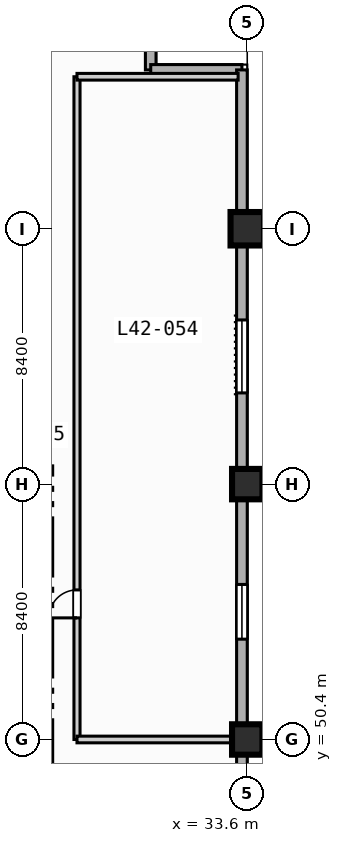
"""IFC4 building model, lengths in metres.
Left out: names, types, materials, properties, quantities, classifications, styles, units other than length and angle.
Written with IfcOpenShell. Run it as: python <this file> out.ifc"""

import sys

from ifc_helpers import new_model, si_unit, direction, frame, frame_2d, origin, origin_2d, place, context, subcontext, project, spatial, rectangle, extrude, element, fill, save


model = new_model("IFC4")
c1 = context("Model", 3, precision=1e-05, world=origin(), true_north=direction((0.0, 1.0)))
c2 = subcontext(c1, "Body", "Model", "MODEL_VIEW")
j1 = project(units=[si_unit("LENGTHUNIT", "METRE"), si_unit("PLANEANGLEUNIT", "RADIAN")], contexts=[c1])
p1 = place(None, origin())
s1 = spatial("IfcSite", under=j1, at=p1, CompositionType="ELEMENT")
p2 = place(p1, origin())
s2 = spatial("IfcBuilding", under=s1, at=p2, CompositionType="ELEMENT")
p3 = place(p2, frame((0.0, 0.0, 175.4)))
s3 = spatial("IfcBuildingStorey", under=s2, at=p3, CompositionType="ELEMENT", Elevation=175.4)
for number, where, z_axis, x_axis in (
    (1, (33.6, 50.4, 0.0), (0.0, 0.0, 1.0), (1.0, 0.0, 0.0)),
    (2, (33.6, 58.8, 0.0), (0.0, 0.0, 1.0), (1.0, 0.0, 0.0)),
):
    element("IfcColumn", number, at=place(p3, frame(where, z_axis=z_axis, x_axis=x_axis)), inside=s3, PredefinedType="COLUMN", context=c2, shape_type="SweptSolid", body=[
        extrude(rectangle(XDim=1.0, YDim=1.0, at=origin_2d()), origin(), (0.0, 0.0, 1.0), 3.7),
    ])
p4 = place(p3, frame((33.6, 67.2, 0.0), z_axis=(0.0, 0.0, 1.0), x_axis=(1.0, 0.0, 0.0)))
e3 = element("IfcColumn", 3, at=p4, inside=s3, PredefinedType="COLUMN", context=c2, shape_type="SweptSolid", body=[
    extrude(rectangle(XDim=1.1, YDim=1.1, at=origin_2d()), origin(), (0.0, 0.0, 1.0), 3.7),
])
for number, where, z_axis, x_axis in (
    (4, (30.425, 75.425, 0.0), (0.0, 0.0, 1.0), (0.0, -1.0, 0.0)),
    (5, (30.425, 72.425, 0.0), (0.0, 0.0, 1.0), (1.0, 0.0, 0.0)),
):
    element("IfcWall", number, at=place(p3, frame(where, z_axis=z_axis, x_axis=x_axis)), inside=s3, PredefinedType="STANDARD", context=c2, shape_type="SweptSolid", body=[
        extrude(rectangle(XDim=3.0, YDim=0.35, at=frame_2d((1.5, 0.0))), origin(), (0.0, 0.0, 1.0), 3.47),
    ])
p5 = place(p3, frame((33.425, 72.425, 0.0), z_axis=(0.0, 0.0, 1.0), x_axis=(0.0, -1.0, 0.0)))
e6 = element("IfcWall", 6, at=p5, inside=s3, PredefinedType="STANDARD", context=c2, shape_type="SweptSolid", body=[
    extrude(rectangle(XDim=39.0, YDim=0.35, at=frame_2d((19.5, 0.0))), origin(), (0.0, 0.0, 1.0), 3.47),
])
p6 = place(p5, frame((33.725, 0.0, 0.85)))
e7 = element("IfcOpeningElement", 7, at=p6, cuts=e6, PredefinedType="OPENING", context=c2, shape_type="SweptSolid", body=[
    extrude(rectangle(XDim=1.8, YDim=1.8, at=frame_2d((0.9, 0.9))), frame((0.0, 0.185, 0.0), z_axis=(0.0, -1.0, 0.0), x_axis=(1.0, 0.0, 0.0)), (0.0, 0.0, 1.0), 0.37),
])
p7 = place(p5, frame((16.925, 0.0, 0.85)))
e8 = element("IfcOpeningElement", 8, at=p7, cuts=e6, PredefinedType="OPENING", context=c2, shape_type="SweptSolid", body=[
    extrude(rectangle(XDim=1.8, YDim=1.8, at=frame_2d((0.9, 0.9))), frame((0.0, 0.185, 0.0), z_axis=(0.0, -1.0, 0.0), x_axis=(1.0, 0.0, 0.0)), (0.0, 0.0, 1.0), 0.37),
])
p8 = place(p5, frame((8.225, 0.0, 0.85)))
e9 = element("IfcOpeningElement", 9, at=p8, cuts=e6, PredefinedType="OPENING", context=c2, shape_type="SweptSolid", body=[
    extrude(rectangle(XDim=2.4, YDim=1.95, at=frame_2d((1.2, 0.975))), frame((0.0, 0.185, 0.0), z_axis=(0.0, -1.0, 0.0), x_axis=(1.0, 0.0, 0.0)), (0.0, 0.0, 1.0), 0.37),
])
p9 = place(p3, frame((28.0, 50.4, 0.0), z_axis=(0.0, 0.0, 1.0), x_axis=(0.0, 1.0, 0.0)))
e10 = element("IfcWall", 10, at=p9, inside=s3, PredefinedType="PARTITIONING", context=c2, shape_type="SweptSolid", body=[
    extrude(rectangle(XDim=21.8, YDim=0.2, at=frame_2d((10.9, 0.0))), origin(), (0.0, 0.0, 1.0), 3.47),
])
p10 = place(p9, frame((4.0, 0.0, 0.0)))
e11 = element("IfcOpeningElement", 11, at=p10, cuts=e10, PredefinedType="OPENING", context=c2, shape_type="SweptSolid", body=[
    extrude(rectangle(XDim=0.92, YDim=2.1, at=frame_2d((0.46, 1.05))), frame((0.0, 0.11, 0.0), z_axis=(0.0, -1.0, 0.0), x_axis=(1.0, 0.0, 0.0)), (0.0, 0.0, 1.0), 0.22),
])
p11 = place(p3, frame((28.0, 50.4, 0.0), z_axis=(0.0, 0.0, 1.0), x_axis=(1.0, 0.0, 0.0)))
e12 = element("IfcWall", 12, at=p11, inside=s3, PredefinedType="PARTITIONING", context=c2, shape_type="SweptSolid", body=[
    extrude(rectangle(XDim=5.3, YDim=0.22, at=frame_2d((2.65, 0.0))), origin(), (0.0, 0.0, 1.0), 3.007),
])
p12 = place(p3, frame((28.0, 72.2, 0.0), z_axis=(0.0, 0.0, 1.0), x_axis=(1.0, 0.0, 0.0)))
e13 = element("IfcWall", 13, at=p12, inside=s3, PredefinedType="PARTITIONING", context=c2, shape_type="SweptSolid", body=[
    extrude(rectangle(XDim=5.3, YDim=0.22, at=frame_2d((2.65, 0.0))), origin(), (0.0, 0.0, 1.0), 3.47),
])
p13 = place(p7, origin())
e14 = element("IfcWindow", 14, at=p13, inside=s3, PartitioningType="SINGLE_PANEL", PredefinedType="WINDOW", context=c2, shape_type="SweptSolid", body=[
    extrude(rectangle(XDim=1.8, YDim=1.8, at=frame_2d((0.9, 0.9))), frame((0.0, 0.03, 0.0), z_axis=(0.0, -1.0, 0.0), x_axis=(1.0, 0.0, 0.0)), (0.0, 0.0, 1.0), 0.06),
])
fill(e8, e14)
p14 = place(p8, origin())
e15 = element("IfcWindow", 15, at=p14, inside=s3, PartitioningType="SINGLE_PANEL", PredefinedType="WINDOW", context=c2, shape_type="SweptSolid", body=[
    extrude(rectangle(XDim=2.4, YDim=1.95, at=frame_2d((1.2, 0.975))), frame((0.0, 0.03, 0.0), z_axis=(0.0, -1.0, 0.0), x_axis=(1.0, 0.0, 0.0)), (0.0, 0.0, 1.0), 0.06),
])
fill(e9, e15)
p15 = place(p10, origin())
e16 = element("IfcDoor", 16, at=p15, inside=s3, OperationType="SINGLE_SWING_LEFT", PredefinedType="DOOR", context=c2, shape_type="SweptSolid", body=[
    extrude(rectangle(XDim=0.92, YDim=2.1, at=frame_2d((0.46, 1.05))), frame((0.0, 0.025, 0.0), z_axis=(0.0, -1.0, 0.0), x_axis=(1.0, 0.0, 0.0)), (0.0, 0.0, 1.0), 0.05),
])
fill(e11, e16)
save(model, sys.argv[1])
